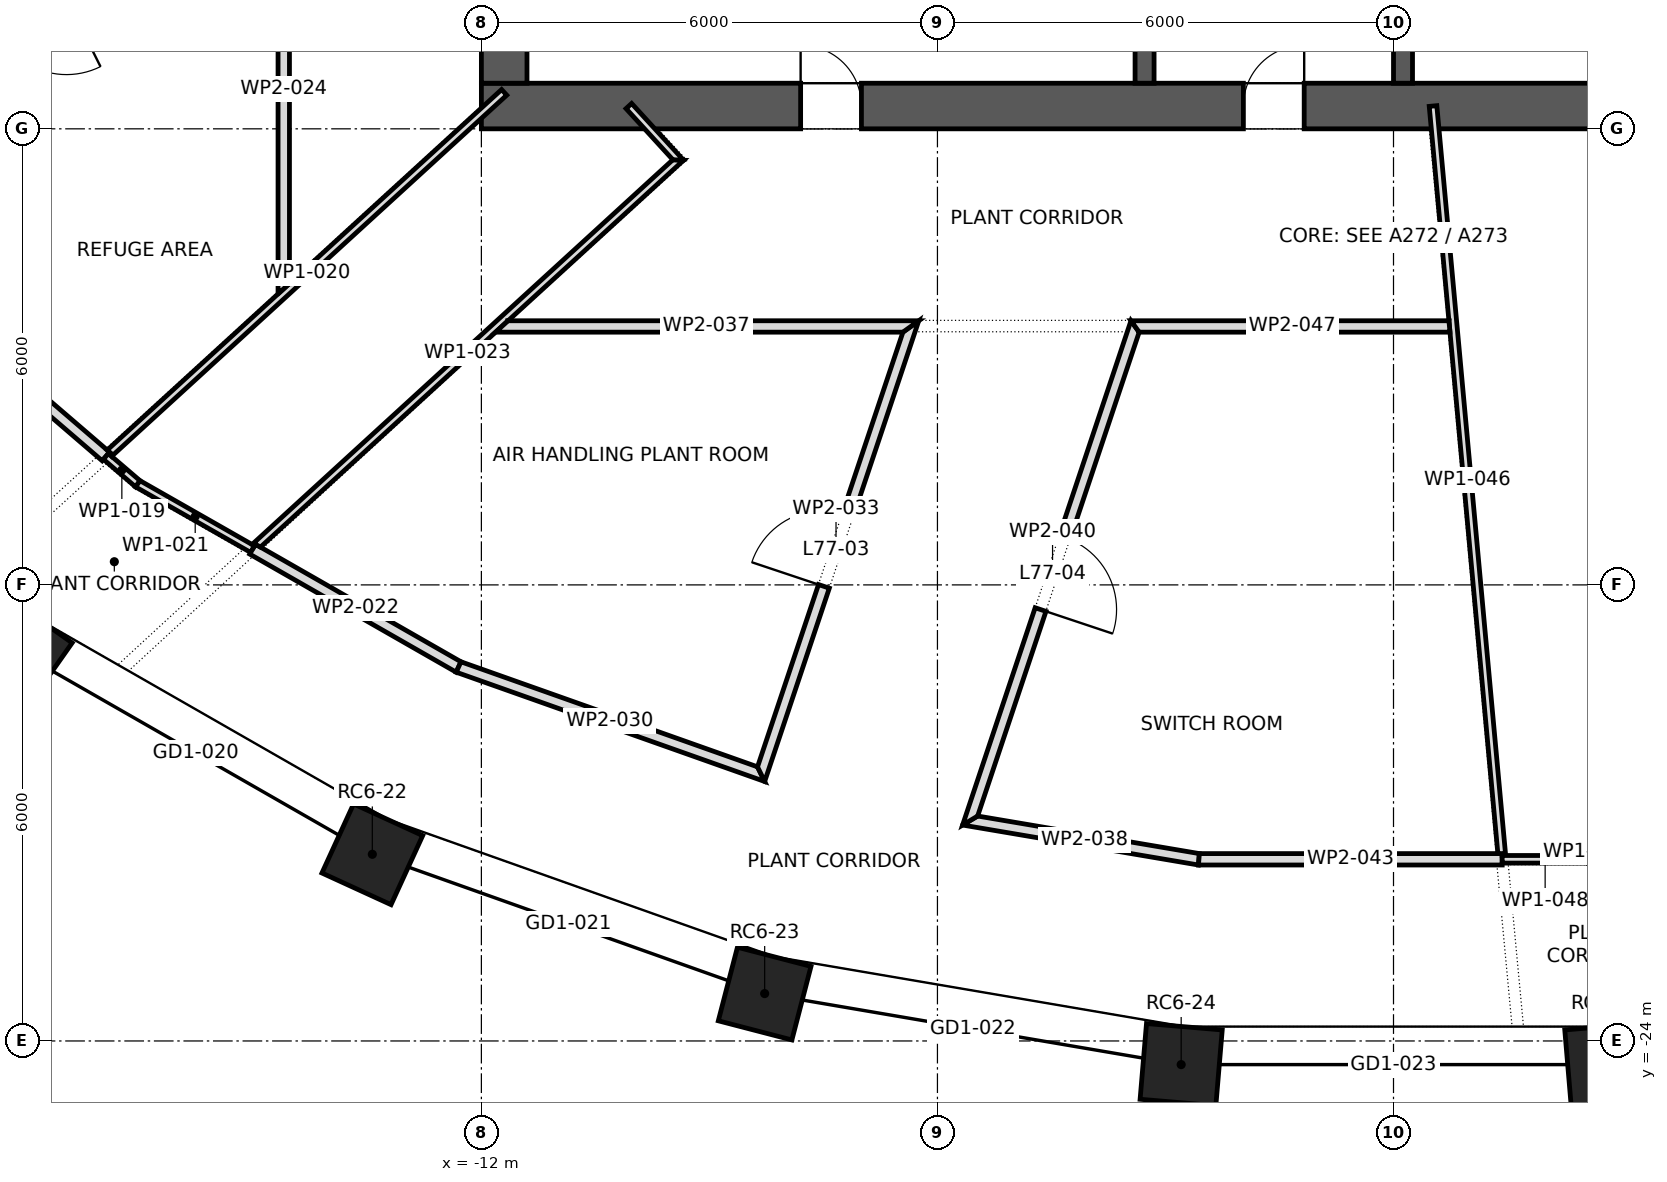
"""IFC4 building model, lengths in metres.
Left out: names, types, materials, properties, quantities, classifications, styles, units other than length and angle.
Written with IfcOpenShell. Run it as: python <this file> out.ifc"""

import sys

from ifc_helpers import new_model, si_unit, direction, frame, frame_2d, origin, origin_2d, place, context, subcontext, project, spatial, polyline, rectangle, outline, extrude, element, fill, save


model = new_model("IFC4")
c1 = context("Model", 3, precision=1e-05, world=origin(), true_north=direction((0.0, 1.0)))
c2 = subcontext(c1, "Body", "Model", "MODEL_VIEW")
j1 = project(units=[si_unit("LENGTHUNIT", "METRE"), si_unit("PLANEANGLEUNIT", "RADIAN")], contexts=[c1])
p1 = place(None, origin())
s1 = spatial("IfcSite", under=j1, at=p1, CompositionType="ELEMENT")
p2 = place(p1, origin())
s2 = spatial("IfcBuilding", under=s1, at=p2, CompositionType="ELEMENT")
p3 = place(p2, frame((0.0, 0.0, 328.3)))
s3 = spatial("IfcBuildingStorey", under=s2, at=p3, CompositionType="ELEMENT", Elevation=328.3)
for number, where, z_axis, x_axis in (
    (1, (-18.08, -18.884, 0.0), (0.0, 0.0, 1.0), (0.818, -0.575, 0.0)),
    (2, (-13.435, -21.544, 0.0), (0.0, 0.0, 1.0), (0.909, -0.417, 0.0)),
    (3, (-8.273, -23.377, 0.0), (0.0, 0.0, 1.0), (0.968, -0.252, 0.0)),
    (4, (-2.793, -24.311, 0.0), (0.0, 0.0, 1.0), (0.996, -0.084, 0.0)),
    (5, (2.793, -24.311, 0.0), (0.0, 0.0, 1.0), (0.996, 0.084, 0.0)),
):
    element("IfcColumn", number, at=place(p3, frame(where, z_axis=z_axis, x_axis=x_axis)), inside=s3, PredefinedType="COLUMN", context=c2, shape_type="SweptSolid", body=[
        extrude(rectangle(XDim=1.0, YDim=1.0, at=origin_2d()), origin(), (0.0, 0.0, 1.0), 5.0),
    ])
p4 = place(p3, frame((-12.0, -11.7, 0.0), z_axis=(0.0, 0.0, 1.0), x_axis=(1.0, 0.0, 0.0)))
e6 = element("IfcWall", 6, at=p4, inside=s3, PredefinedType="SHEAR", context=c2, shape_type="SweptSolid", body=[
    extrude(rectangle(XDim=24.0, YDim=0.6, at=frame_2d((12.0, 0.0))), origin(), (0.0, 0.0, 1.0), 5.0),
])
p5 = place(p4, frame((10.025, 0.0, 0.0)))
e7 = element("IfcOpeningElement", 7, at=p5, cuts=e6, PredefinedType="OPENING", context=c2, shape_type="SweptSolid", body=[
    extrude(rectangle(XDim=0.8, YDim=2.1, at=frame_2d((0.4, 1.05))), frame((0.0, 0.312, 0.0), z_axis=(0.0, -1.0, 0.0), x_axis=(1.0, 0.0, 0.0)), (0.0, 0.0, 1.0), 0.624),
])
p6 = place(p4, frame((4.2, 0.0, 0.0)))
e8 = element("IfcOpeningElement", 8, at=p6, cuts=e6, PredefinedType="OPENING", context=c2, shape_type="SweptSolid", body=[
    extrude(rectangle(XDim=0.8, YDim=2.1, at=frame_2d((0.4, 1.05))), frame((0.0, 0.312, 0.0), z_axis=(0.0, -1.0, 0.0), x_axis=(1.0, 0.0, 0.0)), (0.0, 0.0, 1.0), 0.624),
])
p7 = place(p4, frame((15.85, 0.0, 0.0)))
e9 = element("IfcOpeningElement", 9, at=p7, cuts=e6, PredefinedType="OPENING", context=c2, shape_type="SweptSolid", body=[
    extrude(rectangle(XDim=0.8, YDim=2.1, at=frame_2d((0.4, 1.05))), frame((0.0, 0.312, 0.0), z_axis=(0.0, -1.0, 0.0), x_axis=(1.0, 0.0, 0.0)), (0.0, 0.0, 1.0), 0.624),
])
p8 = place(p3, frame((-11.7, -11.4, 0.0), z_axis=(0.0, 0.0, 1.0), x_axis=(0.0, 1.0, 0.0)))
e10 = element("IfcWall", 10, at=p8, inside=s3, PredefinedType="SHEAR", context=c2, shape_type="SweptSolid", body=[
    extrude(rectangle(XDim=22.8, YDim=0.6, at=frame_2d((11.4, 0.0))), origin(), (0.0, 0.0, 1.0), 5.0),
])
p9 = place(p8, frame((10.2, 0.0, 0.0)))
e11 = element("IfcOpeningElement", 11, at=p9, cuts=e10, PredefinedType="OPENING", context=c2, shape_type="SweptSolid", body=[
    extrude(rectangle(XDim=2.4, YDim=2.1, at=frame_2d((1.2, 1.05))), frame((0.0, 0.312, 0.0), z_axis=(0.0, -1.0, 0.0), x_axis=(1.0, 0.0, 0.0)), (0.0, 0.0, 1.0), 0.624),
])
p10 = place(p8, frame((18.925, 0.0, 0.0)))
e12 = element("IfcOpeningElement", 12, at=p10, cuts=e10, PredefinedType="OPENING", context=c2, shape_type="SweptSolid", body=[
    extrude(rectangle(XDim=1.2, YDim=2.1, at=frame_2d((0.6, 1.05))), frame((0.0, 0.312, 0.0), z_axis=(0.0, -1.0, 0.0), x_axis=(1.0, 0.0, 0.0)), (0.0, 0.0, 1.0), 0.624),
])
p11 = place(p8, frame((2.675, 0.0, 0.0)))
e13 = element("IfcOpeningElement", 13, at=p11, cuts=e10, PredefinedType="OPENING", context=c2, shape_type="SweptSolid", body=[
    extrude(rectangle(XDim=1.2, YDim=2.1, at=frame_2d((0.6, 1.05))), frame((0.0, 0.312, 0.0), z_axis=(0.0, -1.0, 0.0), x_axis=(1.0, 0.0, 0.0)), (0.0, 0.0, 1.0), 0.624),
])
for number, where, z_axis, x_axis in (
    (14, (-3.275, -11.4, 0.0), (0.0, 0.0, 1.0), (0.0, 1.0, 0.0)),
    (15, (0.125, -11.4, 0.0), (0.0, 0.0, 1.0), (0.0, 1.0, 0.0)),
):
    element("IfcWall", number, at=place(p3, frame(where, z_axis=z_axis, x_axis=x_axis)), inside=s3, PredefinedType="SHEAR", context=c2, shape_type="SweptSolid", body=[
        extrude(rectangle(XDim=4.9, YDim=0.25, at=frame_2d((2.45, 0.0))), origin(), (0.0, 0.0, 1.0), 4.65),
    ])
p12 = place(p3, frame((-20.076, -13.615, 0.0), z_axis=(0.0, 0.0, 1.0), x_axis=(0.75838482234, -0.651807073638, 0.0)))
e16 = element("IfcWall", 16, at=p12, inside=s3, PredefinedType="PARTITIONING", context=c2, shape_type="SweptSolid", body=[
    extrude(outline(polyline([(4.135, 0.075), (2.761, 0.075), (1.388, 0.075), (0.015, 0.075), (0.0, -0.075), (1.378, -0.075), (2.757, -0.075), (4.135, -0.075), (4.135, 0.075)])), origin(), (0.0, 0.0, 1.0), 4.65),
])
p13 = place(p3, frame((-16.94, -16.31, 0.0), z_axis=(0.0, 0.0, 1.0), x_axis=(0.759287493017, -0.650755332632, 0.0)))
e17 = element("IfcWall", 17, at=p13, inside=s3, PredefinedType="PARTITIONING", context=c2, shape_type="SweptSolid", body=[
    extrude(outline(polyline([(0.558, -0.05), (0.558, -0.05), (0.548, 0.05), (0.0, 0.05), (0.0, -0.05), (0.558, -0.05)])), origin(), (0.0, 0.0, 1.0), 4.65),
])
p14 = place(p3, frame((-16.898, -16.272, 0.0), z_axis=(0.0, 0.0, 1.0), x_axis=(0.738080105563, 0.674713092931, 0.0)))
e18 = element("IfcWall", 18, at=p14, inside=s3, PredefinedType="PARTITIONING", context=c2, shape_type="SweptSolid", body=[
    extrude(outline(polyline([(7.043, 0.05), (5.152, 0.05), (3.261, 0.05), (3.259, 0.048), (3.257, 0.05), (1.635, 0.05), (0.013, 0.05), (0.018, 0.009), (0.0, 0.007), (0.0, -0.05), (1.761, -0.05), (3.521, -0.05), (5.282, -0.05), (7.043, -0.05), (7.043, 0.05)])), origin(), (0.0, 0.0, 1.0), 4.65),
])
p15 = place(p3, frame((-16.524, -16.667, 0.0), z_axis=(0.0, 0.0, 1.0), x_axis=(0.868906227939, -0.494976733845, 0.0)))
e19 = element("IfcWall", 19, at=p15, inside=s3, PredefinedType="PARTITIONING", context=c2, shape_type="SweptSolid", body=[
    extrude(outline(polyline([(1.743, 0.05), (0.01, 0.05), (0.0, -0.05), (1.743, -0.05), (1.743, 0.05)])), origin(), (0.0, 0.0, 1.0), 4.65),
])
p16 = place(p3, frame((-15.01, -17.53, 0.0), z_axis=(0.0, 0.0, 1.0), x_axis=(0.868060601706, -0.496458247757, 0.0)))
e20 = element("IfcWall", 20, at=p16, inside=s3, PredefinedType="PARTITIONING", context=c2, shape_type="SweptSolid", body=[
    extrude(outline(polyline([(3.129, -0.075), (3.129, -0.075), (3.115, 0.075), (1.558, 0.075), (0.0, 0.075), (0.0, -0.075), (1.564, -0.075), (3.129, -0.075)])), origin(), (0.0, 0.0, 1.0), 4.65),
])
p17 = place(p3, frame((-14.983, -17.505, 0.0), z_axis=(0.0, 0.0, 1.0), x_axis=(0.738034752837, 0.6747627017, 0.0)))
e21 = element("IfcWall", 21, at=p17, inside=s3, PredefinedType="PARTITIONING", context=c2, shape_type="SweptSolid", body=[
    extrude(outline(polyline([(0.058, -0.05), (1.528, -0.05), (2.998, -0.05), (4.467, -0.05), (4.469, -0.048), (4.472, -0.05), (6.036, -0.05), (7.601, -0.05), (7.601, -0.05), (7.551, 0.0), (7.501, 0.05), (7.501, 0.05), (5.626, 0.05), (3.751, 0.05), (1.875, 0.05), (0.0, 0.05), (0.0, 0.05), (0.011, 0.015), (0.0, 0.012), (0.0, 0.012), (0.035, 0.023), (0.058, -0.05)])), origin(), (0.0, 0.0, 1.0), 4.65),
])
p18 = place(p3, frame((-14.6, -14.171, 0.0), z_axis=(0.0, 0.0, 1.0), x_axis=(0.0, 1.0, 0.0)))
e22 = element("IfcWall", 22, at=p18, inside=s3, PredefinedType="PARTITIONING", context=c2, shape_type="SweptSolid", body=[
    extrude(outline(polyline([(0.137, -0.075), (1.902, -0.075), (3.667, -0.075), (5.432, -0.075), (5.311, 0.0), (5.19, 0.075), (5.19, 0.075), (5.19, 0.075), (3.46, 0.075), (1.73, 0.075), (0.0, 0.075), (0.0, 0.074), (0.137, -0.075)])), origin(), (0.0, 0.0, 1.0), 4.65),
])
p19 = place(p3, frame((-14.491, -8.806, 0.0), z_axis=(0.0, 0.0, 1.0), x_axis=(-0.89470325258, -0.446661045786, 0.0)))
e23 = element("IfcWall", 23, at=p19, inside=s3, PredefinedType="PARTITIONING", context=c2, shape_type="SweptSolid", body=[
    extrude(outline(polyline([(7.601, -0.075), (7.601, -0.075), (7.417, 0.075), (5.624, 0.075), (3.83, 0.075), (2.036, 0.075), (0.243, 0.075), (0.0, -0.075), (1.9, -0.075), (3.801, -0.075), (5.701, -0.075), (7.601, -0.075)])), origin(), (0.0, 0.0, 1.0), 4.65),
])
p20 = place(p19, frame((3.315, 0.0, 0.0)))
e24 = element("IfcOpeningElement", 24, at=p20, cuts=e23, PredefinedType="OPENING", context=c2, shape_type="SweptSolid", body=[
    extrude(rectangle(XDim=1.0, YDim=2.1, at=frame_2d((0.5, 1.05))), frame((0.0, 0.087, 0.0), z_axis=(0.0, -1.0, 0.0), x_axis=(1.0, 0.0, 0.0)), (0.0, 0.0, 1.0), 0.174),
])
p21 = place(p3, frame((-12.306, -19.078, 0.0), z_axis=(0.0, 0.0, 1.0), x_axis=(0.9426149562, -0.333881781995, 0.0)))
e25 = element("IfcWall", 25, at=p21, inside=s3, PredefinedType="PARTITIONING", context=c2, shape_type="SweptSolid", body=[
    extrude(outline(polyline([(0.0, -0.075), (1.435, -0.075), (2.87, -0.075), (4.305, -0.075), (4.153, 0.075), (2.773, 0.075), (1.393, 0.075), (0.013, 0.075), (0.0, -0.075), (0.0, -0.075)])), origin(), (0.0, 0.0, 1.0), 4.65),
])
p22 = place(p3, frame((-9.376, -12.447, 0.0), z_axis=(0.0, 0.0, 1.0), x_axis=(-0.67520050009, 0.73763424858, 0.0)))
e26 = element("IfcWall", 26, at=p22, inside=s3, PredefinedType="PARTITIONING", context=c2, shape_type="SweptSolid", body=[
    extrude(outline(polyline([(1.013, 0.05), (0.1, 0.05), (0.0, -0.05), (1.013, -0.05), (1.013, 0.05)])), origin(), (0.0, 0.0, 1.0), 4.65),
])
p23 = place(p3, frame((-8.344, -20.562, 0.0), z_axis=(0.0, 0.0, 1.0), x_axis=(0.317201665136, 0.948358109384, 0.0)))
e27 = element("IfcWall", 27, at=p23, inside=s3, PredefinedType="PARTITIONING", context=c2, shape_type="SweptSolid", body=[
    extrude(outline(polyline([(0.0, -0.075), (1.598, -0.075), (3.196, -0.075), (4.793, -0.075), (6.391, -0.075), (6.183, 0.075), (4.676, 0.075), (3.168, 0.075), (1.66, 0.075), (0.153, 0.075), (0.0, -0.075)])), origin(), (0.0, 0.0, 1.0), 4.65),
])
p24 = place(p23, frame((2.682, 0.0, 0.0)))
e28 = element("IfcOpeningElement", 28, at=p24, cuts=e27, PredefinedType="OPENING", context=c2, shape_type="SweptSolid", body=[
    extrude(rectangle(XDim=1.0, YDim=2.1, at=frame_2d((0.5, 1.05))), frame((0.0, 0.087, 0.0), z_axis=(0.0, -1.0, 0.0), x_axis=(1.0, 0.0, 0.0)), (0.0, 0.0, 1.0), 0.174),
])
p25 = place(p3, frame((-6.246, -14.6, 0.0), z_axis=(0.0, 0.0, 1.0), x_axis=(-1.0, 0.0, 0.0)))
e29 = element("IfcWall", 29, at=p25, inside=s3, PredefinedType="PARTITIONING", context=c2, shape_type="SweptSolid", body=[
    extrude(outline(polyline([(0.0, -0.075), (1.801, -0.075), (3.602, -0.075), (5.404, -0.075), (5.567, 0.075), (3.781, 0.075), (1.995, 0.075), (0.208, 0.075), (0.208, 0.075), (0.208, 0.075), (0.104, 0.0), (0.0, -0.075)])), origin(), (0.0, 0.0, 1.0), 4.65),
])
p26 = place(p3, frame((-5.656, -21.085, 0.0), z_axis=(0.0, 0.0, 1.0), x_axis=(0.985950038145, -0.167040480967, 0.0)))
e30 = element("IfcWall", 30, at=p26, inside=s3, PredefinedType="PARTITIONING", context=c2, shape_type="SweptSolid", body=[
    extrude(outline(polyline([(0.0, -0.075), (1.573, -0.075), (3.147, -0.075), (3.134, 0.075), (1.655, 0.075), (0.175, 0.075), (0.0, -0.075), (0.0, -0.075)])), origin(), (0.0, 0.0, 1.0), 4.65),
])
p27 = place(p3, frame((-3.383, -14.549, 0.0), z_axis=(0.0, 0.0, 1.0), x_axis=(-0.316657063648, -0.948540090899, 0.0)))
e31 = element("IfcWall", 31, at=p27, inside=s3, PredefinedType="PARTITIONING", context=c2, shape_type="SweptSolid", body=[
    extrude(outline(polyline([(0.0, -0.075), (1.749, -0.075), (3.497, -0.075), (5.246, -0.075), (6.994, -0.075), (6.819, 0.075), (5.142, 0.075), (3.464, 0.075), (1.786, 0.075), (0.108, 0.075), (0.0, -0.075)])), origin(), (0.0, 0.0, 1.0), 4.65),
])
p28 = place(p27, frame((2.98, 0.0, 0.0)))
e32 = element("IfcOpeningElement", 32, at=p28, cuts=e31, PredefinedType="OPENING", context=c2, shape_type="SweptSolid", body=[
    extrude(rectangle(XDim=1.0, YDim=2.1, at=frame_2d((0.5, 1.05))), frame((0.0, 0.087, 0.0), z_axis=(0.0, -1.0, 0.0), x_axis=(1.0, 0.0, 0.0)), (0.0, 0.0, 1.0), 0.174),
])
p29 = place(p3, frame((-2.566, -21.61, 0.0), z_axis=(0.0, 0.0, 1.0), x_axis=(1.0, 0.0, 0.0)))
e33 = element("IfcWall", 33, at=p29, inside=s3, PredefinedType="PARTITIONING", context=c2, shape_type="SweptSolid", body=[
    extrude(outline(polyline([(3.996, 0.075), (2.005, 0.075), (0.013, 0.075), (0.0, -0.075), (1.998, -0.075), (3.996, -0.075), (3.996, 0.075)])), origin(), (0.0, 0.0, 1.0), 4.65),
])
p30 = place(p3, frame((0.52, -11.7, 0.0), z_axis=(0.0, 0.0, 1.0), x_axis=(0.091437926601, -0.995810777999, 0.0)))
e34 = element("IfcWall", 34, at=p30, inside=s3, PredefinedType="PARTITIONING", context=c2, shape_type="SweptSolid", body=[
    extrude(outline(polyline([(0.0, -0.05), (1.416, -0.05), (2.832, -0.05), (2.833, -0.049), (2.842, -0.05), (4.599, -0.05), (6.357, -0.05), (8.114, -0.05), (9.872, -0.05), (9.877, 0.007), (9.902, 0.005), (9.906, 0.046), (9.906, 0.05), (7.925, 0.05), (5.943, 0.05), (3.962, 0.05), (1.981, 0.05), (0.0, 0.05), (0.0, -0.05)])), origin(), (0.0, 0.0, 1.0), 4.65),
])
p31 = place(p3, frame((0.742, -14.6, 0.0), z_axis=(0.0, 0.0, 1.0), x_axis=(-1.0, 0.0, 0.0)))
e35 = element("IfcWall", 35, at=p31, inside=s3, PredefinedType="PARTITIONING", context=c2, shape_type="SweptSolid", body=[
    extrude(outline(polyline([(0.013, -0.075), (1.408, -0.075), (2.802, -0.075), (4.196, -0.075), (4.142, 0.0), (4.088, 0.075), (2.726, 0.075), (1.363, 0.075), (0.0, 0.075), (0.0, 0.069), (0.013, -0.075)])), origin(), (0.0, 0.0, 1.0), 4.65),
])
p32 = place(p3, frame((1.43, -21.61, 0.0), z_axis=(0.0, 0.0, 1.0), x_axis=(1.0, 0.0, 0.0)))
e36 = element("IfcWall", 36, at=p32, inside=s3, PredefinedType="PARTITIONING", context=c2, shape_type="SweptSolid", body=[
    extrude(outline(polyline([(1.134, -0.05), (1.134, -0.05), (1.126, 0.05), (0.0, 0.05), (0.0, -0.05), (1.134, -0.05)])), origin(), (0.0, 0.0, 1.0), 4.65),
])
p33 = place(p3, frame((2.556, -21.611, 0.0), z_axis=(0.0, 0.0, 1.0), x_axis=(0.985894311429, 0.167369073287, 0.0)))
e37 = element("IfcWall", 37, at=p33, inside=s3, PredefinedType="PARTITIONING", context=c2, shape_type="SweptSolid", body=[
    extrude(outline(polyline([(1.079, 0.05), (0.008, 0.05), (0.0, -0.049), (0.0, -0.05), (1.079, -0.05), (1.079, 0.05)])), origin(), (0.0, 0.0, 1.0), 4.65),
])
p34 = place(p5, origin())
e38 = element("IfcDoor", 38, at=p34, inside=s3, OperationType="SINGLE_SWING_LEFT", PredefinedType="DOOR", context=c2, shape_type="SweptSolid", body=[
    extrude(rectangle(XDim=0.8, YDim=2.1, at=frame_2d((0.4, 1.05))), frame((0.0, 0.025, 0.0), z_axis=(0.0, -1.0, 0.0), x_axis=(1.0, 0.0, 0.0)), (0.0, 0.0, 1.0), 0.05),
])
fill(e7, e38)
p35 = place(p6, origin())
e39 = element("IfcDoor", 39, at=p35, inside=s3, OperationType="SINGLE_SWING_RIGHT", PredefinedType="DOOR", context=c2, shape_type="SweptSolid", body=[
    extrude(rectangle(XDim=0.8, YDim=2.1, at=frame_2d((0.4, 1.05))), frame((0.0, 0.025, 0.0), z_axis=(0.0, -1.0, 0.0), x_axis=(1.0, 0.0, 0.0)), (0.0, 0.0, 1.0), 0.05),
])
fill(e8, e39)
p36 = place(p24, origin())
e40 = element("IfcDoor", 40, at=p36, inside=s3, OperationType="SINGLE_SWING_RIGHT", PredefinedType="DOOR", context=c2, shape_type="SweptSolid", body=[
    extrude(rectangle(XDim=1.0, YDim=2.1, at=frame_2d((0.5, 1.05))), frame((0.0, 0.025, 0.0), z_axis=(0.0, -1.0, 0.0), x_axis=(1.0, 0.0, 0.0)), (0.0, 0.0, 1.0), 0.05),
])
fill(e28, e40)
p37 = place(p28, origin())
e41 = element("IfcDoor", 41, at=p37, inside=s3, OperationType="SINGLE_SWING_LEFT", PredefinedType="DOOR", context=c2, shape_type="SweptSolid", body=[
    extrude(rectangle(XDim=1.0, YDim=2.1, at=frame_2d((0.5, 1.05))), frame((0.0, 0.025, 0.0), z_axis=(0.0, -1.0, 0.0), x_axis=(1.0, 0.0, 0.0)), (0.0, 0.0, 1.0), 0.05),
])
fill(e32, e41)
save(model, sys.argv[1])
